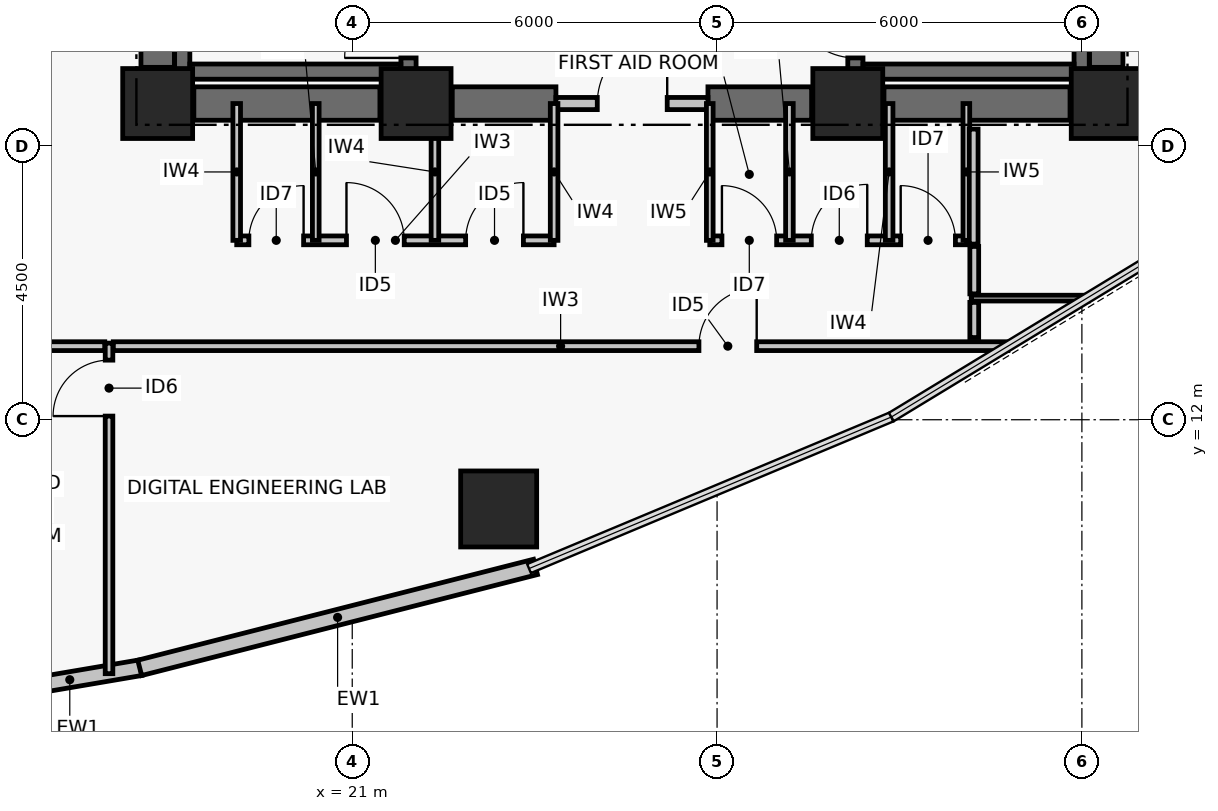
"""IFC4 building model, lengths in metres.
Left out: names, types, materials, properties, quantities, classifications, styles, units other than length and angle.
Written with IfcOpenShell. Run it as: python <this file> out.ifc"""

import sys

from ifc_helpers import new_model, si_unit, direction, frame, frame_2d, origin, origin_2d, place, context, subcontext, project, spatial, rectangle, hollow_rectangle, extrude, element, fill, save


model = new_model("IFC4")
c1 = context("Model", 3, precision=1e-05, world=origin(), true_north=direction((0.0, 1.0)))
c2 = subcontext(c1, "Body", "Model", "MODEL_VIEW")
j1 = project(units=[si_unit("LENGTHUNIT", "METRE"), si_unit("PLANEANGLEUNIT", "RADIAN")], contexts=[c1])
p1 = place(None, origin())
s1 = spatial("IfcSite", under=j1, at=p1, CompositionType="ELEMENT")
p2 = place(p1, origin())
s2 = spatial("IfcBuilding", under=s1, at=p2, CompositionType="ELEMENT")
p3 = place(p2, frame((0.0, 0.0, 100.26)))
s3 = spatial("IfcBuildingStorey", under=s2, at=p3, CompositionType="ELEMENT", Elevation=100.26)
for number, where, z_axis, x_axis in (
    (1, (17.8, 17.2, 0.0), (0.0, 0.0, 1.0), (1.0, 0.0, 0.0)),
    (2, (22.05, 17.2, 0.0), (0.0, 0.0, 1.0), (1.0, 0.0, 0.0)),
    (3, (29.15, 17.2, 0.0), (0.0, 0.0, 1.0), (1.0, 0.0, 0.0)),
    (4, (33.4, 17.2, 0.0), (0.0, 0.0, 1.0), (1.0, 0.0, 0.0)),
):
    element("IfcColumn", number, at=place(p3, frame(where, z_axis=z_axis, x_axis=x_axis)), inside=s3, PredefinedType="COLUMN", context=c2, shape_type="SweptSolid", body=[
        extrude(rectangle(XDim=1.15, YDim=1.15, at=origin_2d()), origin(), (0.0, 0.0, 1.0), 3.72),
    ])
p4 = place(p3, frame((18.395, 17.2, 0.0), z_axis=(0.0, 0.0, 1.0), x_axis=(1.0, 0.0, 0.0)))
e5 = element("IfcWall", 5, at=p4, inside=s3, PredefinedType="SHEAR", context=c2, shape_type="SweptSolid", body=[
    extrude(rectangle(XDim=3.06, YDim=0.55, at=frame_2d((1.53, 0.0))), origin(), (0.0, 0.0, 1.0), 3.44),
])
p5 = place(p3, frame((22.645, 17.2, 0.0), z_axis=(0.0, 0.0, 1.0), x_axis=(1.0, 0.0, 0.0)))
e6 = element("IfcWall", 6, at=p5, inside=s3, PredefinedType="SHEAR", context=c2, shape_type="SweptSolid", body=[
    extrude(rectangle(XDim=1.705, YDim=0.55, at=frame_2d((0.853, 0.0))), origin(), (0.0, 0.0, 1.0), 3.44),
])
p6 = place(p3, frame((26.85, 17.2, 0.0), z_axis=(0.0, 0.0, 1.0), x_axis=(1.0, 0.0, 0.0)))
e7 = element("IfcWall", 7, at=p6, inside=s3, PredefinedType="SHEAR", context=c2, shape_type="SweptSolid", body=[
    extrude(rectangle(XDim=1.705, YDim=0.55, at=frame_2d((0.853, 0.0))), origin(), (0.0, 0.0, 1.0), 3.44),
])
p7 = place(p3, frame((29.745, 17.2, 0.0), z_axis=(0.0, 0.0, 1.0), x_axis=(1.0, 0.0, 0.0)))
e8 = element("IfcWall", 8, at=p7, inside=s3, PredefinedType="SHEAR", context=c2, shape_type="SweptSolid", body=[
    extrude(rectangle(XDim=3.06, YDim=0.55, at=frame_2d((1.53, 0.0))), origin(), (0.0, 0.0, 1.0), 3.44),
])
for number, where, z_axis, x_axis in (
    (9, (17.8, 17.795, 0.0), (0.0, 0.0, 1.0), (0.0, 1.0, 0.0)),
    (10, (33.4, 17.795, 0.0), (0.0, 0.0, 1.0), (0.0, 1.0, 0.0)),
):
    element("IfcWall", number, at=place(p3, frame(where, z_axis=z_axis, x_axis=x_axis)), inside=s3, PredefinedType="SHEAR", context=c2, shape_type="SweptSolid", body=[
        extrude(rectangle(XDim=8.41, YDim=0.55, at=frame_2d((4.205, 0.0))), origin(), (0.0, 0.0, 1.0), 3.44),
    ])
p8 = place(p3, frame((18.204, 17.6, 0.0), z_axis=(0.0, 0.0, 1.0), x_axis=(0.0, 1.0, 0.0)))
e11 = element("IfcWall", 11, at=p8, inside=s3, PredefinedType="SHEAR", context=c2, shape_type="SweptSolid", body=[
    extrude(rectangle(XDim=8.8, YDim=0.25, at=frame_2d((4.4, 0.0))), origin(), (0.0, 0.0, 1.0), 3.44),
])
p9 = place(p3, frame((21.925, 17.6, 0.0), z_axis=(0.0, 0.0, 1.0), x_axis=(0.0, 1.0, 0.0)))
e12 = element("IfcWall", 12, at=p9, inside=s3, PredefinedType="SHEAR", context=c2, shape_type="SweptSolid", body=[
    extrude(rectangle(XDim=8.8, YDim=0.25, at=frame_2d((4.4, 0.0))), origin(), (0.0, 0.0, 1.0), 3.44),
])
p10 = place(p9, frame((0.35, 0.0, 0.0)))
e13 = element("IfcOpeningElement", 13, at=p10, cuts=e12, PredefinedType="OPENING", context=c2, shape_type="SweptSolid", body=[
    extrude(rectangle(XDim=1.05, YDim=2.08, at=frame_2d((0.525, 1.04))), frame((0.0, 0.135, 0.0), z_axis=(0.0, -1.0, 0.0), x_axis=(1.0, 0.0, 0.0)), (0.0, 0.0, 1.0), 0.27),
])
p11 = place(p3, frame((18.329, 17.725, 0.0), z_axis=(0.0, 0.0, 1.0), x_axis=(1.0, 0.0, 0.0)))
e14 = element("IfcWall", 14, at=p11, inside=s3, PredefinedType="SHEAR", context=c2, shape_type="SweptSolid", body=[
    extrude(rectangle(XDim=3.471, YDim=0.25, at=frame_2d((1.735, 0.0))), origin(), (0.0, 0.0, 1.0), 3.44),
])
p12 = place(p3, frame((29.275, 17.6, 0.0), z_axis=(0.0, 0.0, 1.0), x_axis=(0.0, 1.0, 0.0)))
e15 = element("IfcWall", 15, at=p12, inside=s3, PredefinedType="SHEAR", context=c2, shape_type="SweptSolid", body=[
    extrude(rectangle(XDim=8.8, YDim=0.25, at=frame_2d((4.4, 0.0))), origin(), (0.0, 0.0, 1.0), 3.44),
])
p13 = place(p12, frame((0.35, 0.0, 0.0)))
e16 = element("IfcOpeningElement", 16, at=p13, cuts=e15, PredefinedType="OPENING", context=c2, shape_type="SweptSolid", body=[
    extrude(rectangle(XDim=1.05, YDim=2.08, at=frame_2d((0.525, 1.04))), frame((0.0, 0.135, 0.0), z_axis=(0.0, -1.0, 0.0), x_axis=(1.0, 0.0, 0.0)), (0.0, 0.0, 1.0), 0.27),
])
p14 = place(p3, frame((32.996, 17.6, 0.0), z_axis=(0.0, 0.0, 1.0), x_axis=(0.0, 1.0, 0.0)))
e17 = element("IfcWall", 17, at=p14, inside=s3, PredefinedType="SHEAR", context=c2, shape_type="SweptSolid", body=[
    extrude(rectangle(XDim=8.8, YDim=0.25, at=frame_2d((4.4, 0.0))), origin(), (0.0, 0.0, 1.0), 3.44),
])
p15 = place(p3, frame((29.4, 17.725, 0.0), z_axis=(0.0, 0.0, 1.0), x_axis=(1.0, 0.0, 0.0)))
e18 = element("IfcWall", 18, at=p15, inside=s3, PredefinedType="SHEAR", context=c2, shape_type="SweptSolid", body=[
    extrude(rectangle(XDim=3.471, YDim=0.25, at=frame_2d((1.736, 0.0))), origin(), (0.0, 0.0, 1.0), 3.44),
])
p16 = place(p3, frame((23.408, 10.533, 0.0), z_axis=(0.0, 0.0, 1.0), x_axis=(1.0, 0.0, 0.0)))
e19 = element("IfcColumn", 19, at=p16, inside=s3, PredefinedType="COLUMN", context=c2, shape_type="SweptSolid", body=[
    extrude(hollow_rectangle(XDim=1.25, YDim=1.25, WallThickness=0.05, at=origin_2d()), origin(), (0.0, 0.0, 1.0), 3.72),
])
p17 = place(p3, frame((17.516, 7.922, 0.0), z_axis=(0.0, 0.0, 1.0), x_axis=(-0.985905269947, -0.167304508875, 0.0)))
e20 = element("IfcWall", 20, at=p17, inside=s3, PredefinedType="PARTITIONING", context=c2, shape_type="SweptSolid", body=[
    extrude(rectangle(XDim=2.357, YDim=0.26, at=frame_2d((1.178, 0.0))), origin(), (0.0, 0.0, 1.0), 3.44),
])
p18 = place(p3, frame((24.014, 9.58, 0.0), z_axis=(0.0, 0.0, 1.0), x_axis=(-0.968981437296, -0.247133514876, 0.0)))
e21 = element("IfcWall", 21, at=p18, inside=s3, PredefinedType="PARTITIONING", context=c2, shape_type="SweptSolid", body=[
    extrude(rectangle(XDim=6.718, YDim=0.26, at=frame_2d((3.359, 0.0))), origin(), (0.0, 0.0, 1.0), 3.44),
])
p19 = place(p3, frame((24.35, 17.2, 0.0), z_axis=(0.0, 0.0, 1.0), x_axis=(1.0, 0.0, 0.0)))
e22 = element("IfcWall", 22, at=p19, inside=s3, PredefinedType="PARTITIONING", context=c2, shape_type="SweptSolid", body=[
    extrude(rectangle(XDim=2.5, YDim=0.2, at=frame_2d((1.25, 0.0))), origin(), (0.0, 0.0, 1.0), 2.57),
])
p20 = place(p19, frame((0.68, 0.0, 0.0)))
e23 = element("IfcOpeningElement", 23, at=p20, cuts=e22, PredefinedType="OPENING", context=c2, shape_type="SweptSolid", body=[
    extrude(rectangle(XDim=1.15, YDim=2.08, at=frame_2d((0.575, 1.04))), frame((0.0, 0.11, 0.0), z_axis=(0.0, -1.0, 0.0), x_axis=(1.0, 0.0, 0.0)), (0.0, 0.0, 1.0), 0.22),
])
p21 = place(p3, frame((19.1, 14.95, 0.0), z_axis=(0.0, 0.0, 1.0), x_axis=(1.0, 0.0, 0.0)))
e24 = element("IfcWall", 24, at=p21, inside=s3, PredefinedType="PARTITIONING", context=c2, shape_type="SweptSolid", body=[
    extrude(rectangle(XDim=5.22, YDim=0.145, at=frame_2d((2.61, 0.0))), origin(), (0.0, 0.0, 1.0), 2.17),
])
p22 = place(p21, frame((0.2, 0.0, 0.0)))
e25 = element("IfcOpeningElement", 25, at=p22, cuts=e24, PredefinedType="OPENING", context=c2, shape_type="SweptSolid", body=[
    extrude(rectangle(XDim=0.9, YDim=2.02, at=frame_2d((0.45, 1.01))), frame((0.0, 0.083, 0.0), z_axis=(0.0, -1.0, 0.0), x_axis=(1.0, 0.0, 0.0)), (0.0, 0.0, 1.0), 0.165),
])
p23 = place(p21, frame((1.805, 0.0, 0.0)))
e26 = element("IfcOpeningElement", 26, at=p23, cuts=e24, PredefinedType="OPENING", context=c2, shape_type="SweptSolid", body=[
    extrude(rectangle(XDim=0.95, YDim=2.06, at=frame_2d((0.475, 1.03))), frame((0.0, 0.083, 0.0), z_axis=(0.0, -1.0, 0.0), x_axis=(1.0, 0.0, 0.0)), (0.0, 0.0, 1.0), 0.165),
])
p24 = place(p21, frame((3.765, 0.0, 0.0)))
e27 = element("IfcOpeningElement", 27, at=p24, cuts=e24, PredefinedType="OPENING", context=c2, shape_type="SweptSolid", body=[
    extrude(rectangle(XDim=0.95, YDim=2.06, at=frame_2d((0.475, 1.03))), frame((0.0, 0.083, 0.0), z_axis=(0.0, -1.0, 0.0), x_axis=(1.0, 0.0, 0.0)), (0.0, 0.0, 1.0), 0.165),
])
p25 = place(p3, frame((26.88, 14.95, 0.0), z_axis=(0.0, 0.0, 1.0), x_axis=(1.0, 0.0, 0.0)))
e28 = element("IfcWall", 28, at=p25, inside=s3, PredefinedType="PARTITIONING", context=c2, shape_type="SweptSolid", body=[
    extrude(rectangle(XDim=4.22, YDim=0.145, at=frame_2d((2.11, 0.0))), origin(), (0.0, 0.0, 1.0), 3.02),
])
p26 = place(p25, frame((0.2, 0.0, 0.0)))
e29 = element("IfcOpeningElement", 29, at=p26, cuts=e28, PredefinedType="OPENING", context=c2, shape_type="SweptSolid", body=[
    extrude(rectangle(XDim=0.9, YDim=2.02, at=frame_2d((0.45, 1.01))), frame((0.0, 0.083, 0.0), z_axis=(0.0, -1.0, 0.0), x_axis=(1.0, 0.0, 0.0)), (0.0, 0.0, 1.0), 0.165),
])
p27 = place(p25, frame((1.67, 0.0, 0.0)))
e30 = element("IfcOpeningElement", 30, at=p27, cuts=e28, PredefinedType="OPENING", context=c2, shape_type="SweptSolid", body=[
    extrude(rectangle(XDim=0.92, YDim=2.05, at=frame_2d((0.46, 1.025))), frame((0.0, 0.083, 0.0), z_axis=(0.0, -1.0, 0.0), x_axis=(1.0, 0.0, 0.0)), (0.0, 0.0, 1.0), 0.165),
])
p28 = place(p25, frame((3.14, 0.0, 0.0)))
e31 = element("IfcOpeningElement", 31, at=p28, cuts=e28, PredefinedType="OPENING", context=c2, shape_type="SweptSolid", body=[
    extrude(rectangle(XDim=0.9, YDim=2.02, at=frame_2d((0.45, 1.01))), frame((0.0, 0.083, 0.0), z_axis=(0.0, -1.0, 0.0), x_axis=(1.0, 0.0, 0.0)), (0.0, 0.0, 1.0), 0.165),
])
p29 = place(p3, frame((19.1, 14.95, 0.0), z_axis=(0.0, 0.0, 1.0), x_axis=(0.0, 1.0, 0.0)))
e32 = element("IfcWall", 32, at=p29, inside=s3, PredefinedType="PARTITIONING", context=c2, shape_type="SweptSolid", body=[
    extrude(rectangle(XDim=2.25, YDim=0.125, at=frame_2d((1.125, 0.0))), origin(), (0.0, 0.0, 1.0), 2.57),
])
p30 = place(p3, frame((20.4, 14.95, 0.0), z_axis=(0.0, 0.0, 1.0), x_axis=(0.0, 1.0, 0.0)))
e33 = element("IfcWall", 33, at=p30, inside=s3, PredefinedType="PARTITIONING", context=c2, shape_type="SweptSolid", body=[
    extrude(rectangle(XDim=2.25, YDim=0.11, at=frame_2d((1.125, 0.0))), origin(), (0.0, 0.0, 1.0), 2.57),
])
p31 = place(p3, frame((22.36, 14.95, 0.0), z_axis=(0.0, 0.0, 1.0), x_axis=(0.0, 1.0, 0.0)))
e34 = element("IfcWall", 34, at=p31, inside=s3, PredefinedType="PARTITIONING", context=c2, shape_type="SweptSolid", body=[
    extrude(rectangle(XDim=2.25, YDim=0.125, at=frame_2d((1.125, 0.0))), origin(), (0.0, 0.0, 1.0), 2.17),
])
p32 = place(p3, frame((24.32, 14.95, 0.0), z_axis=(0.0, 0.0, 1.0), x_axis=(0.0, 1.0, 0.0)))
e35 = element("IfcWall", 35, at=p32, inside=s3, PredefinedType="PARTITIONING", context=c2, shape_type="SweptSolid", body=[
    extrude(rectangle(XDim=2.25, YDim=0.125, at=frame_2d((1.125, 0.0))), origin(), (0.0, 0.0, 1.0), 2.57),
])
p33 = place(p3, frame((26.88, 14.95, 0.0), z_axis=(0.0, 0.0, 1.0), x_axis=(0.0, 1.0, 0.0)))
e36 = element("IfcWall", 36, at=p33, inside=s3, PredefinedType="PARTITIONING", context=c2, shape_type="SweptSolid", body=[
    extrude(rectangle(XDim=2.25, YDim=0.11, at=frame_2d((1.125, 0.0))), origin(), (0.0, 0.0, 1.0), 2.57),
])
for number, where, z_axis, x_axis in (
    (37, (28.19, 14.95, 0.0), (0.0, 0.0, 1.0), (0.0, 1.0, 0.0)),
    (38, (29.83, 14.95, 0.0), (0.0, 0.0, 1.0), (0.0, 1.0, 0.0)),
):
    element("IfcWall", number, at=place(p3, frame(where, z_axis=z_axis, x_axis=x_axis)), inside=s3, PredefinedType="PARTITIONING", context=c2, shape_type="SweptSolid", body=[
        extrude(rectangle(XDim=2.25, YDim=0.125, at=frame_2d((1.125, 0.0))), origin(), (0.0, 0.0, 1.0), 2.57),
    ])
p34 = place(p3, frame((31.1, 14.95, 0.0), z_axis=(0.0, 0.0, 1.0), x_axis=(0.0, 1.0, 0.0)))
e39 = element("IfcWall", 39, at=p34, inside=s3, PredefinedType="PARTITIONING", context=c2, shape_type="SweptSolid", body=[
    extrude(rectangle(XDim=2.25, YDim=0.11, at=frame_2d((1.125, 0.0))), origin(), (0.0, 0.0, 1.0), 2.57),
])
p35 = place(p3, frame((15.9, 13.21, 0.0), z_axis=(0.0, 0.0, 1.0), x_axis=(1.0, 0.0, 0.0)))
e40 = element("IfcWall", 40, at=p35, inside=s3, PredefinedType="PARTITIONING", context=c2, shape_type="SweptSolid", body=[
    extrude(rectangle(XDim=1.03, YDim=0.145, at=frame_2d((0.515, 0.0))), origin(), (0.0, 0.0, 1.0), 2.17),
])
p36 = place(p3, frame((17.07, 13.21, 0.0), z_axis=(0.0, 0.0, 1.0), x_axis=(1.0, 0.0, 0.0)))
e41 = element("IfcWall", 41, at=p36, inside=s3, PredefinedType="PARTITIONING", context=c2, shape_type="SweptSolid", body=[
    extrude(rectangle(XDim=14.714, YDim=0.145, at=frame_2d((7.357, 0.0))), origin(), (0.0, 0.0, 1.0), 2.17),
])
p37 = place(p36, frame((9.632, 0.0, 0.0)))
e42 = element("IfcOpeningElement", 42, at=p37, cuts=e41, PredefinedType="OPENING", context=c2, shape_type="SweptSolid", body=[
    extrude(rectangle(XDim=0.95, YDim=2.06, at=frame_2d((0.475, 1.03))), frame((0.0, 0.083, 0.0), z_axis=(0.0, -1.0, 0.0), x_axis=(1.0, 0.0, 0.0)), (0.0, 0.0, 1.0), 0.165),
])
p38 = place(p3, frame((31.23, 13.351, 0.0), z_axis=(0.0, 0.0, 1.0), x_axis=(0.0, 1.0, 0.0)))
e43 = element("IfcWall", 43, at=p38, inside=s3, PredefinedType="PARTITIONING", context=c2, shape_type="SweptSolid", body=[
    extrude(rectangle(XDim=0.579, YDim=0.145, at=frame_2d((0.289, 0.0))), origin(), (0.0, 0.0, 1.0), 3.44),
])
p39 = place(p3, frame((31.23, 14.07, 0.0), z_axis=(0.0, 0.0, 1.0), x_axis=(0.0, 1.0, 0.0)))
e44 = element("IfcWall", 44, at=p39, inside=s3, PredefinedType="PARTITIONING", context=c2, shape_type="SweptSolid", body=[
    extrude(rectangle(XDim=0.78, YDim=0.145, at=frame_2d((0.39, 0.0))), origin(), (0.0, 0.0, 1.0), 2.82),
])
p40 = place(p3, frame((31.22, 14.889, 0.0), z_axis=(0.0, 0.0, 1.0), x_axis=(0.0, 1.0, 0.0)))
e45 = element("IfcWall", 45, at=p40, inside=s3, PredefinedType="PARTITIONING", context=c2, shape_type="SweptSolid", body=[
    extrude(rectangle(XDim=1.891, YDim=0.145, at=frame_2d((0.946, 0.0))), origin(), (0.0, 0.0, 1.0), 2.57),
])
p41 = place(p3, frame((17.0, 7.824, 0.0), z_axis=(0.0, 0.0, 1.0), x_axis=(0.0, 1.0, 0.0)))
e46 = element("IfcWall", 46, at=p41, inside=s3, PredefinedType="PARTITIONING", context=c2, shape_type="SweptSolid", body=[
    extrude(rectangle(XDim=5.436, YDim=0.125, at=frame_2d((2.718, 0.0))), origin(), (0.0, 0.0, 1.0), 2.82),
])
p42 = place(p41, frame((4.236, 0.0, 0.0)))
e47 = element("IfcOpeningElement", 47, at=p42, cuts=e46, PredefinedType="OPENING", context=c2, shape_type="SweptSolid", body=[
    extrude(rectangle(XDim=0.92, YDim=2.05, at=frame_2d((0.46, 1.025))), frame((0.0, 0.073, 0.0), z_axis=(0.0, -1.0, 0.0), x_axis=(1.0, 0.0, 0.0)), (0.0, 0.0, 1.0), 0.145),
])
p43 = place(p3, frame((31.18, 14.0, 0.0), z_axis=(0.0, 0.0, 1.0), x_axis=(1.0, 0.0, 0.0)))
e48 = element("IfcWall", 48, at=p43, inside=s3, PredefinedType="PARTITIONING", context=c2, shape_type="SweptSolid", body=[
    extrude(rectangle(XDim=1.924, YDim=0.095, at=frame_2d((0.962, 0.0))), origin(), (0.0, 0.0, 1.0), 3.44),
])
p44 = place(p10, origin())
e49 = element("IfcDoor", 49, at=p44, inside=s3, OperationType="SINGLE_SWING_LEFT", PredefinedType="DOOR", context=c2, shape_type="SweptSolid", body=[
    extrude(rectangle(XDim=1.05, YDim=2.08, at=frame_2d((0.525, 1.04))), frame((0.0, 0.025, 0.0), z_axis=(0.0, -1.0, 0.0), x_axis=(1.0, 0.0, 0.0)), (0.0, 0.0, 1.0), 0.05),
])
fill(e13, e49)
p45 = place(p13, origin())
e50 = element("IfcDoor", 50, at=p45, inside=s3, OperationType="SINGLE_SWING_RIGHT", PredefinedType="DOOR", context=c2, shape_type="SweptSolid", body=[
    extrude(rectangle(XDim=1.05, YDim=2.08, at=frame_2d((0.525, 1.04))), frame((0.0, 0.025, 0.0), z_axis=(0.0, -1.0, 0.0), x_axis=(1.0, 0.0, 0.0)), (0.0, 0.0, 1.0), 0.05),
])
fill(e16, e50)
p46 = place(p20, origin())
e51 = element("IfcDoor", 51, at=p46, inside=s3, OperationType="SINGLE_SWING_RIGHT", PredefinedType="DOOR", context=c2, shape_type="SweptSolid", body=[
    extrude(rectangle(XDim=1.15, YDim=2.08, at=frame_2d((0.575, 1.04))), frame((0.0, 0.025, 0.0), z_axis=(0.0, -1.0, 0.0), x_axis=(1.0, 0.0, 0.0)), (0.0, 0.0, 1.0), 0.05),
])
fill(e23, e51)
p47 = place(p22, origin())
e52 = element("IfcDoor", 52, at=p47, inside=s3, OperationType="SINGLE_SWING_RIGHT", PredefinedType="DOOR", context=c2, shape_type="SweptSolid", body=[
    extrude(rectangle(XDim=0.9, YDim=2.02, at=frame_2d((0.45, 1.01))), frame((0.0, 0.025, 0.0), z_axis=(0.0, -1.0, 0.0), x_axis=(1.0, 0.0, 0.0)), (0.0, 0.0, 1.0), 0.05),
])
fill(e25, e52)
p48 = place(p23, origin())
e53 = element("IfcDoor", 53, at=p48, inside=s3, OperationType="SINGLE_SWING_LEFT", PredefinedType="DOOR", context=c2, shape_type="SweptSolid", body=[
    extrude(rectangle(XDim=0.95, YDim=2.06, at=frame_2d((0.475, 1.03))), frame((0.0, 0.025, 0.0), z_axis=(0.0, -1.0, 0.0), x_axis=(1.0, 0.0, 0.0)), (0.0, 0.0, 1.0), 0.05),
])
fill(e26, e53)
p49 = place(p24, origin())
e54 = element("IfcDoor", 54, at=p49, inside=s3, OperationType="SINGLE_SWING_RIGHT", PredefinedType="DOOR", context=c2, shape_type="SweptSolid", body=[
    extrude(rectangle(XDim=0.95, YDim=2.06, at=frame_2d((0.475, 1.03))), frame((0.0, 0.025, 0.0), z_axis=(0.0, -1.0, 0.0), x_axis=(1.0, 0.0, 0.0)), (0.0, 0.0, 1.0), 0.05),
])
fill(e27, e54)
p50 = place(p26, origin())
e55 = element("IfcDoor", 55, at=p50, inside=s3, OperationType="SINGLE_SWING_LEFT", PredefinedType="DOOR", context=c2, shape_type="SweptSolid", body=[
    extrude(rectangle(XDim=0.9, YDim=2.02, at=frame_2d((0.45, 1.01))), frame((0.0, 0.025, 0.0), z_axis=(0.0, -1.0, 0.0), x_axis=(1.0, 0.0, 0.0)), (0.0, 0.0, 1.0), 0.05),
])
fill(e29, e55)
p51 = place(p27, origin())
e56 = element("IfcDoor", 56, at=p51, inside=s3, OperationType="SINGLE_SWING_RIGHT", PredefinedType="DOOR", context=c2, shape_type="SweptSolid", body=[
    extrude(rectangle(XDim=0.92, YDim=2.05, at=frame_2d((0.46, 1.025))), frame((0.0, 0.025, 0.0), z_axis=(0.0, -1.0, 0.0), x_axis=(1.0, 0.0, 0.0)), (0.0, 0.0, 1.0), 0.05),
])
fill(e30, e56)
p52 = place(p28, origin())
e57 = element("IfcDoor", 57, at=p52, inside=s3, OperationType="SINGLE_SWING_LEFT", PredefinedType="DOOR", context=c2, shape_type="SweptSolid", body=[
    extrude(rectangle(XDim=0.9, YDim=2.02, at=frame_2d((0.45, 1.01))), frame((0.0, 0.025, 0.0), z_axis=(0.0, -1.0, 0.0), x_axis=(1.0, 0.0, 0.0)), (0.0, 0.0, 1.0), 0.05),
])
fill(e31, e57)
p53 = place(p37, origin())
e58 = element("IfcDoor", 58, at=p53, inside=s3, OperationType="SINGLE_SWING_RIGHT", PredefinedType="DOOR", context=c2, shape_type="SweptSolid", body=[
    extrude(rectangle(XDim=0.95, YDim=2.06, at=frame_2d((0.475, 1.03))), frame((0.0, 0.025, 0.0), z_axis=(0.0, -1.0, 0.0), x_axis=(1.0, 0.0, 0.0)), (0.0, 0.0, 1.0), 0.05),
])
fill(e42, e58)
p54 = place(p42, origin())
e59 = element("IfcDoor", 59, at=p54, inside=s3, OperationType="SINGLE_SWING_LEFT", PredefinedType="DOOR", context=c2, shape_type="SweptSolid", body=[
    extrude(rectangle(XDim=0.92, YDim=2.05, at=frame_2d((0.46, 1.025))), frame((0.0, 0.025, 0.0), z_axis=(0.0, -1.0, 0.0), x_axis=(1.0, 0.0, 0.0)), (0.0, 0.0, 1.0), 0.05),
])
fill(e47, e59)
save(model, sys.argv[1])
